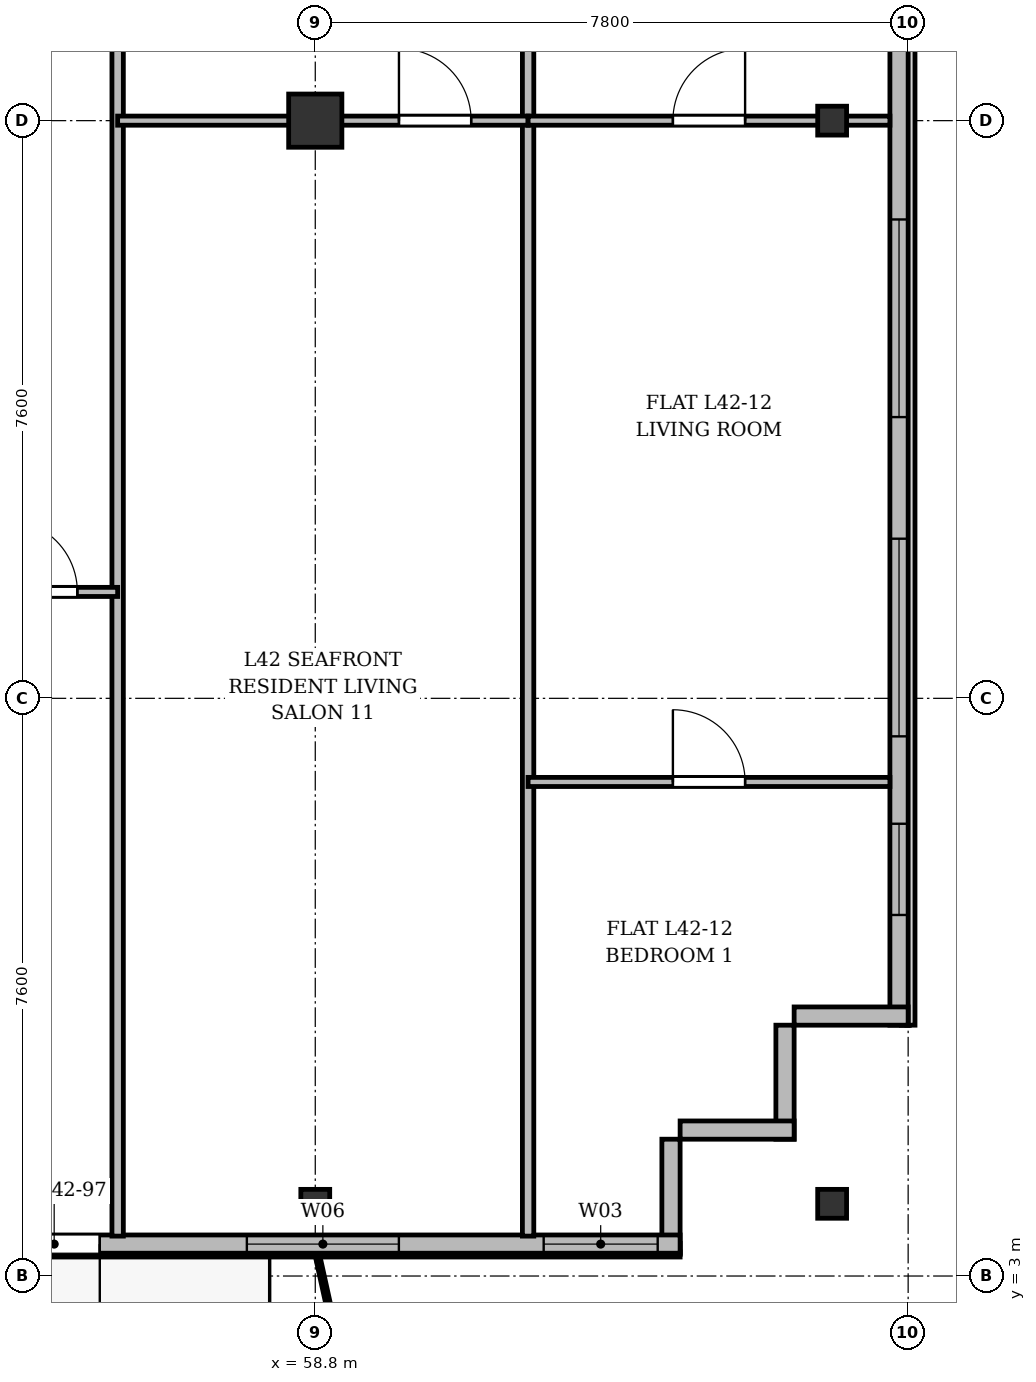
"""IFC4 building model, lengths in metres.
Left out: names, types, materials, properties, quantities, classifications, styles, units other than length and angle.
Written with IfcOpenShell. Run it as: python <this file> out.ifc"""

import sys

from ifc_helpers import new_model, si_unit, direction, frame, frame_2d, origin, origin_2d, place, context, subcontext, project, spatial, rectangle, i_section, extrude, source, transform, mapped, element, fill, save


model = new_model("IFC4")
c1 = context("Model", 3, precision=1e-05, world=origin(), true_north=direction((0.0, 1.0)))
c2 = subcontext(c1, "Body", "Model", "MODEL_VIEW")
j1 = project(units=[si_unit("LENGTHUNIT", "METRE"), si_unit("PLANEANGLEUNIT", "RADIAN")], contexts=[c1])
p1 = place(None, origin())
s1 = spatial("IfcSite", under=j1, at=p1, CompositionType="ELEMENT")
p2 = place(p1, origin())
s2 = spatial("IfcBuilding", under=s1, at=p2, CompositionType="ELEMENT")
p3 = place(p2, frame((0.0, 0.0, 160.9)))
s3 = spatial("IfcBuildingStorey", under=s2, at=p3, CompositionType="ELEMENT", Elevation=160.9)
m1 = source(origin(), c2, "Body", "SweptSolid", [
    extrude(i_section(OverallWidth=0.38, OverallDepth=0.38, WebThickness=0.02, FlangeThickness=0.03, at=origin_2d()), origin(), (0.0, 0.0, 1.0), 3.6),
])
p4 = place(p3, frame((58.8, 3.95, 0.0), z_axis=(0.0, 0.0, 1.0), x_axis=(1.0, 0.0, 0.0)))
e1 = element("IfcColumn", 1, at=p4, inside=s3, PredefinedType="COLUMN", context=c2, shape_type="MappedRepresentation", body=[
    mapped(m1, transform((0.0, 0.0, 0.0), x_axis=(1.0, 0.0, 0.0), y_axis=(0.0, 1.0, 0.0), z_axis=(0.0, 0.0, 1.0), scale=1.0)),
])
m2 = source(origin(), c2, "Body", "SweptSolid", [
    extrude(rectangle(XDim=0.7, YDim=0.7, at=origin_2d()), origin(), (0.0, 0.0, 1.0), 3.6),
])
p5 = place(p3, frame((58.8, 18.2, 0.0), z_axis=(0.0, 0.0, 1.0), x_axis=(1.0, 0.0, 0.0)))
e2 = element("IfcColumn", 2, at=p5, inside=s3, PredefinedType="COLUMN", context=c2, shape_type="MappedRepresentation", body=[
    mapped(m2, transform((0.0, 0.0, 0.0), x_axis=(1.0, 0.0, 0.0), y_axis=(0.0, 1.0, 0.0), z_axis=(0.0, 0.0, 1.0), scale=1.0)),
])
for number, where, z_axis, x_axis in (
    (3, (65.6, 3.95, 0.0), (0.0, 0.0, 1.0), (1.0, 0.0, 0.0)),
    (4, (65.6, 18.2, 0.0), (0.0, 0.0, 1.0), (1.0, 0.0, 0.0)),
):
    element("IfcColumn", number, at=place(p3, frame(where, z_axis=z_axis, x_axis=x_axis)), inside=s3, PredefinedType="COLUMN", context=c2, shape_type="MappedRepresentation", body=[
        mapped(m1, transform((0.0, 0.0, 0.0), x_axis=(1.0, 0.0, 0.0), y_axis=(0.0, 1.0, 0.0), z_axis=(0.0, 0.0, 1.0), scale=1.0)),
    ])
p6 = place(p3, frame((66.48, 45.5, 0.0), z_axis=(0.0, 0.0, 1.0), x_axis=(0.0, -1.0, 0.0)))
e5 = element("IfcWall", 5, at=p6, inside=s3, PredefinedType="SOLIDWALL", context=c2, shape_type="SweptSolid", body=[
    extrude(rectangle(XDim=39.2, YDim=0.24, at=frame_2d((19.6, 0.0))), origin(), (0.0, 0.0, 1.0), 3.35),
])
p7 = place(p6, frame((36.55, 0.0, 0.92)))
e6 = element("IfcOpeningElement", 6, at=p7, cuts=e5, PredefinedType="OPENING", context=c2, shape_type="SweptSolid", body=[
    extrude(rectangle(XDim=1.2, YDim=1.65, at=frame_2d((0.6, 0.825))), frame((0.0, 0.13, 0.0), z_axis=(0.0, -1.0, 0.0), x_axis=(1.0, 0.0, 0.0)), (0.0, 0.0, 1.0), 0.26),
])
p8 = place(p6, frame((32.8, 0.0, 0.92)))
e7 = element("IfcOpeningElement", 7, at=p8, cuts=e5, PredefinedType="OPENING", context=c2, shape_type="SweptSolid", body=[
    extrude(rectangle(XDim=2.6, YDim=1.9, at=frame_2d((1.3, 0.95))), frame((0.0, 0.13, 0.0), z_axis=(0.0, -1.0, 0.0), x_axis=(1.0, 0.0, 0.0)), (0.0, 0.0, 1.0), 0.26),
])
p9 = place(p6, frame((28.6, 0.0, 0.92)))
e8 = element("IfcOpeningElement", 8, at=p9, cuts=e5, PredefinedType="OPENING", context=c2, shape_type="SweptSolid", body=[
    extrude(rectangle(XDim=2.6, YDim=1.9, at=frame_2d((1.3, 0.95))), frame((0.0, 0.13, 0.0), z_axis=(0.0, -1.0, 0.0), x_axis=(1.0, 0.0, 0.0)), (0.0, 0.0, 1.0), 0.26),
])
p10 = place(p6, frame((21.4, 0.0, 0.92)))
e9 = element("IfcOpeningElement", 9, at=p10, cuts=e5, PredefinedType="OPENING", context=c2, shape_type="SweptSolid", body=[
    extrude(rectangle(XDim=2.6, YDim=1.9, at=frame_2d((1.3, 0.95))), frame((0.0, 0.13, 0.0), z_axis=(0.0, -1.0, 0.0), x_axis=(1.0, 0.0, 0.0)), (0.0, 0.0, 1.0), 0.26),
])
p11 = place(p6, frame((7.4, 0.0, 0.92)))
e10 = element("IfcOpeningElement", 10, at=p11, cuts=e5, PredefinedType="OPENING", context=c2, shape_type="SweptSolid", body=[
    extrude(rectangle(XDim=2.6, YDim=1.9, at=frame_2d((1.3, 0.95))), frame((0.0, 0.13, 0.0), z_axis=(0.0, -1.0, 0.0), x_axis=(1.0, 0.0, 0.0)), (0.0, 0.0, 1.0), 0.26),
])
p12 = place(p6, frame((4.5, 0.0, 0.92)))
e11 = element("IfcOpeningElement", 11, at=p12, cuts=e5, PredefinedType="OPENING", context=c2, shape_type="SweptSolid", body=[
    extrude(rectangle(XDim=1.2, YDim=1.65, at=frame_2d((0.6, 0.825))), frame((0.0, 0.13, 0.0), z_axis=(0.0, -1.0, 0.0), x_axis=(1.0, 0.0, 0.0)), (0.0, 0.0, 1.0), 0.26),
])
p13 = place(p6, frame((1.15, 0.0, 0.92)))
e12 = element("IfcOpeningElement", 12, at=p13, cuts=e5, PredefinedType="OPENING", context=c2, shape_type="SweptSolid", body=[
    extrude(rectangle(XDim=1.2, YDim=1.65, at=frame_2d((0.6, 0.825))), frame((0.0, 0.13, 0.0), z_axis=(0.0, -1.0, 0.0), x_axis=(1.0, 0.0, 0.0)), (0.0, 0.0, 1.0), 0.26),
])
p14 = place(p3, frame((66.6, 6.42, 0.0), z_axis=(0.0, 0.0, 1.0), x_axis=(-1.0, 0.0, 0.0)))
e13 = element("IfcWall", 13, at=p14, inside=s3, PredefinedType="SOLIDWALL", context=c2, shape_type="SweptSolid", body=[
    extrude(rectangle(XDim=1.5, YDim=0.24, at=frame_2d((0.75, 0.0))), origin(), (0.0, 0.0, 1.0), 2.85),
])
for number, where, z_axis, x_axis in (
    (14, (64.98, 6.3, 0.0), (0.0, 0.0, 1.0), (0.0, -1.0, 0.0)),
    (15, (65.1, 4.92, 0.0), (0.0, 0.0, 1.0), (-1.0, 0.0, 0.0)),
):
    element("IfcWall", number, at=place(p3, frame(where, z_axis=z_axis, x_axis=x_axis)), inside=s3, PredefinedType="SOLIDWALL", context=c2, shape_type="SweptSolid", body=[
        extrude(rectangle(XDim=1.5, YDim=0.24, at=frame_2d((0.75, 0.0))), origin(), (0.0, 0.0, 1.0), 3.35),
    ])
p15 = place(p3, frame((63.48, 4.8, 0.0), z_axis=(0.0, 0.0, 1.0), x_axis=(0.0, -1.0, 0.0)))
e16 = element("IfcWall", 16, at=p15, inside=s3, PredefinedType="SOLIDWALL", context=c2, shape_type="SweptSolid", body=[
    extrude(rectangle(XDim=1.5, YDim=0.24, at=frame_2d((0.75, 0.0))), origin(), (0.0, 0.0, 1.0), 2.75),
])
p16 = place(p3, frame((63.6, 3.42, 0.0), z_axis=(0.0, 0.0, 1.0), x_axis=(-1.0, 0.0, 0.0)))
e17 = element("IfcWall", 17, at=p16, inside=s3, PredefinedType="SOLIDWALL", context=c2, shape_type="SweptSolid", body=[
    extrude(rectangle(XDim=52.8, YDim=0.24, at=frame_2d((26.4, 0.0))), origin(), (0.0, 0.0, 1.0), 3.35),
])
p17 = place(p16, frame((0.295, 0.0, 0.9)))
e18 = element("IfcOpeningElement", 18, at=p17, cuts=e17, PredefinedType="OPENING", context=c2, shape_type="SweptSolid", body=[
    extrude(rectangle(XDim=1.5, YDim=1.75, at=frame_2d((0.75, 0.875))), frame((0.0, 0.13, 0.0), z_axis=(0.0, -1.0, 0.0), x_axis=(1.0, 0.0, 0.0)), (0.0, 0.0, 1.0), 0.26),
])
p18 = place(p16, frame((3.7, 0.0, 0.9)))
e19 = element("IfcOpeningElement", 19, at=p18, cuts=e17, PredefinedType="OPENING", context=c2, shape_type="SweptSolid", body=[
    extrude(rectangle(XDim=2.0, YDim=1.95, at=frame_2d((1.0, 0.975))), frame((0.0, 0.13, 0.0), z_axis=(0.0, -1.0, 0.0), x_axis=(1.0, 0.0, 0.0)), (0.0, 0.0, 1.0), 0.26),
])
p19 = place(p16, frame((7.635, 0.0, 0.0)))
e20 = element("IfcOpeningElement", 20, at=p19, cuts=e17, PredefinedType="OPENING", context=c2, shape_type="SweptSolid", body=[
    extrude(rectangle(XDim=1.2, YDim=2.2, at=frame_2d((0.6, 1.1))), frame((0.0, 0.13, 0.0), z_axis=(0.0, -1.0, 0.0), x_axis=(1.0, 0.0, 0.0)), (0.0, 0.0, 1.0), 0.26),
])
p20 = place(p16, frame((9.7, 0.0, 0.9)))
e21 = element("IfcOpeningElement", 21, at=p20, cuts=e17, PredefinedType="OPENING", context=c2, shape_type="SweptSolid", body=[
    extrude(rectangle(XDim=1.8, YDim=1.8, at=frame_2d((0.9, 0.9))), frame((0.0, 0.13, 0.0), z_axis=(0.0, -1.0, 0.0), x_axis=(1.0, 0.0, 0.0)), (0.0, 0.0, 1.0), 0.26),
])
p21 = place(p16, frame((12.25, 0.0, 0.9)))
e22 = element("IfcOpeningElement", 22, at=p21, cuts=e17, PredefinedType="OPENING", context=c2, shape_type="SweptSolid", body=[
    extrude(rectangle(XDim=1.5, YDim=1.75, at=frame_2d((0.75, 0.875))), frame((0.0, 0.13, 0.0), z_axis=(0.0, -1.0, 0.0), x_axis=(1.0, 0.0, 0.0)), (0.0, 0.0, 1.0), 0.26),
])
p22 = place(p16, frame((16.25, 0.0, 0.9)))
e23 = element("IfcOpeningElement", 23, at=p22, cuts=e17, PredefinedType="OPENING", context=c2, shape_type="SweptSolid", body=[
    extrude(rectangle(XDim=1.5, YDim=1.75, at=frame_2d((0.75, 0.875))), frame((0.0, 0.13, 0.0), z_axis=(0.0, -1.0, 0.0), x_axis=(1.0, 0.0, 0.0)), (0.0, 0.0, 1.0), 0.26),
])
p23 = place(p16, frame((22.4, 0.0, 0.9)))
e24 = element("IfcOpeningElement", 24, at=p23, cuts=e17, PredefinedType="OPENING", context=c2, shape_type="SweptSolid", body=[
    extrude(rectangle(XDim=2.0, YDim=1.95, at=frame_2d((1.0, 0.975))), frame((0.0, 0.13, 0.0), z_axis=(0.0, -1.0, 0.0), x_axis=(1.0, 0.0, 0.0)), (0.0, 0.0, 1.0), 0.26),
])
p24 = place(p16, frame((27.675, 0.0, 0.9)))
e25 = element("IfcOpeningElement", 25, at=p24, cuts=e17, PredefinedType="OPENING", context=c2, shape_type="SweptSolid", body=[
    extrude(rectangle(XDim=1.65, YDim=1.85, at=frame_2d((0.825, 0.925))), frame((0.0, 0.13, 0.0), z_axis=(0.0, -1.0, 0.0), x_axis=(1.0, 0.0, 0.0)), (0.0, 0.0, 1.0), 0.26),
])
p25 = place(p16, frame((30.6, 0.0, 0.9)))
e26 = element("IfcOpeningElement", 26, at=p25, cuts=e17, PredefinedType="OPENING", context=c2, shape_type="SweptSolid", body=[
    extrude(rectangle(XDim=1.8, YDim=1.8, at=frame_2d((0.9, 0.9))), frame((0.0, 0.13, 0.0), z_axis=(0.0, -1.0, 0.0), x_axis=(1.0, 0.0, 0.0)), (0.0, 0.0, 1.0), 0.26),
])
p26 = place(p16, frame((34.1, 0.0, 0.9)))
e27 = element("IfcOpeningElement", 27, at=p26, cuts=e17, PredefinedType="OPENING", context=c2, shape_type="SweptSolid", body=[
    extrude(rectangle(XDim=2.2, YDim=1.8, at=frame_2d((1.1, 0.9))), frame((0.0, 0.13, 0.0), z_axis=(0.0, -1.0, 0.0), x_axis=(1.0, 0.0, 0.0)), (0.0, 0.0, 1.0), 0.26),
])
p27 = place(p16, frame((39.65, 0.0, 0.9)))
e28 = element("IfcOpeningElement", 28, at=p27, cuts=e17, PredefinedType="OPENING", context=c2, shape_type="SweptSolid", body=[
    extrude(rectangle(XDim=1.5, YDim=1.75, at=frame_2d((0.75, 0.875))), frame((0.0, 0.13, 0.0), z_axis=(0.0, -1.0, 0.0), x_axis=(1.0, 0.0, 0.0)), (0.0, 0.0, 1.0), 0.26),
])
p28 = place(p16, frame((43.65, 0.0, 0.9)))
e29 = element("IfcOpeningElement", 29, at=p28, cuts=e17, PredefinedType="OPENING", context=c2, shape_type="SweptSolid", body=[
    extrude(rectangle(XDim=1.5, YDim=1.75, at=frame_2d((0.75, 0.875))), frame((0.0, 0.13, 0.0), z_axis=(0.0, -1.0, 0.0), x_axis=(1.0, 0.0, 0.0)), (0.0, 0.0, 1.0), 0.26),
])
p29 = place(p16, frame((47.275, 0.0, 0.9)))
e30 = element("IfcOpeningElement", 30, at=p29, cuts=e17, PredefinedType="OPENING", context=c2, shape_type="SweptSolid", body=[
    extrude(rectangle(XDim=1.65, YDim=1.85, at=frame_2d((0.825, 0.925))), frame((0.0, 0.13, 0.0), z_axis=(0.0, -1.0, 0.0), x_axis=(1.0, 0.0, 0.0)), (0.0, 0.0, 1.0), 0.26),
])
p30 = place(p16, frame((51.005, 0.0, 0.9)))
e31 = element("IfcOpeningElement", 31, at=p30, cuts=e17, PredefinedType="OPENING", context=c2, shape_type="SweptSolid", body=[
    extrude(rectangle(XDim=1.5, YDim=1.75, at=frame_2d((0.75, 0.875))), frame((0.0, 0.13, 0.0), z_axis=(0.0, -1.0, 0.0), x_axis=(1.0, 0.0, 0.0)), (0.0, 0.0, 1.0), 0.26),
])
p31 = place(p16, frame((37.85, 0.0, 0.0)))
e32 = element("IfcOpeningElement", 32, at=p31, cuts=e17, PredefinedType="OPENING", context=c2, shape_type="SweptSolid", body=[
    extrude(rectangle(XDim=1.2, YDim=2.2, at=frame_2d((0.6, 1.1))), frame((0.0, 0.13, 0.0), z_axis=(0.0, -1.0, 0.0), x_axis=(1.0, 0.0, 0.0)), (0.0, 0.0, 1.0), 0.26),
])
for number, where, z_axis, x_axis in (
    (33, (61.6, 3.525, 0.0), (0.0, 0.0, 1.0), (0.0, 1.0, 0.0)),
    (34, (56.2, 3.525, 0.0), (0.0, 0.0, 1.0), (0.0, 1.0, 0.0)),
):
    element("IfcWall", number, at=place(p3, frame(where, z_axis=z_axis, x_axis=x_axis)), inside=s3, PredefinedType="PARTITIONING", context=c2, shape_type="SweptSolid", body=[
        extrude(rectangle(XDim=27.275, YDim=0.15, at=frame_2d((13.638, 0.0))), origin(), (0.0, 0.0, 1.0), 2.75),
    ])
p32 = place(p3, frame((54.2, 12.0, 0.0), z_axis=(0.0, 0.0, 1.0), x_axis=(1.0, 0.0, 0.0)))
e35 = element("IfcWall", 35, at=p32, inside=s3, PredefinedType="PARTITIONING", context=c2, shape_type="SweptSolid", body=[
    extrude(rectangle(XDim=2.0, YDim=0.12, at=frame_2d((1.0, 0.0))), origin(), (0.0, 0.0, 1.0), 3.35),
])
p33 = place(p32, frame((0.52, 0.0, 0.0)))
e36 = element("IfcOpeningElement", 36, at=p33, cuts=e35, PredefinedType="OPENING", context=c2, shape_type="SweptSolid", body=[
    extrude(rectangle(XDim=0.95, YDim=2.15, at=frame_2d((0.475, 1.075))), frame((0.0, 0.07, 0.0), z_axis=(0.0, -1.0, 0.0), x_axis=(1.0, 0.0, 0.0)), (0.0, 0.0, 1.0), 0.14),
])
p34 = place(p3, frame((56.2, 18.2, 0.0), z_axis=(0.0, 0.0, 1.0), x_axis=(1.0, 0.0, 0.0)))
e37 = element("IfcWall", 37, at=p34, inside=s3, PredefinedType="PARTITIONING", context=c2, shape_type="SweptSolid", body=[
    extrude(rectangle(XDim=5.4, YDim=0.12, at=frame_2d((2.7, 0.0))), origin(), (0.0, 0.0, 1.0), 2.75),
])
p35 = place(p34, frame((3.701, 0.0, 0.0)))
e38 = element("IfcOpeningElement", 38, at=p35, cuts=e37, PredefinedType="OPENING", context=c2, shape_type="SweptSolid", body=[
    extrude(rectangle(XDim=0.95, YDim=2.15, at=frame_2d((0.475, 1.075))), frame((0.0, 0.07, 0.0), z_axis=(0.0, -1.0, 0.0), x_axis=(1.0, 0.0, 0.0)), (0.0, 0.0, 1.0), 0.14),
])
p36 = place(p3, frame((61.6, 18.2, 0.0), z_axis=(0.0, 0.0, 1.0), x_axis=(1.0, 0.0, 0.0)))
e39 = element("IfcWall", 39, at=p36, inside=s3, PredefinedType="PARTITIONING", context=c2, shape_type="SweptSolid", body=[
    extrude(rectangle(XDim=4.76, YDim=0.12, at=frame_2d((2.38, 0.0))), origin(), (0.0, 0.0, 1.0), 2.75),
])
p37 = place(p36, frame((1.905, 0.0, 0.0)))
e40 = element("IfcOpeningElement", 40, at=p37, cuts=e39, PredefinedType="OPENING", context=c2, shape_type="SweptSolid", body=[
    extrude(rectangle(XDim=0.95, YDim=2.15, at=frame_2d((0.475, 1.075))), frame((0.0, 0.07, 0.0), z_axis=(0.0, -1.0, 0.0), x_axis=(1.0, 0.0, 0.0)), (0.0, 0.0, 1.0), 0.14),
])
p38 = place(p3, frame((61.6, 9.5, 0.0), z_axis=(0.0, 0.0, 1.0), x_axis=(1.0, 0.0, 0.0)))
e41 = element("IfcWall", 41, at=p38, inside=s3, PredefinedType="PARTITIONING", context=c2, shape_type="SweptSolid", body=[
    extrude(rectangle(XDim=4.76, YDim=0.12, at=frame_2d((2.38, 0.0))), origin(), (0.0, 0.0, 1.0), 2.85),
])
p39 = place(p38, frame((1.905, 0.0, 0.0)))
e42 = element("IfcOpeningElement", 42, at=p39, cuts=e41, PredefinedType="OPENING", context=c2, shape_type="SweptSolid", body=[
    extrude(rectangle(XDim=0.95, YDim=2.15, at=frame_2d((0.475, 1.075))), frame((0.0, 0.07, 0.0), z_axis=(0.0, -1.0, 0.0), x_axis=(1.0, 0.0, 0.0)), (0.0, 0.0, 1.0), 0.14),
])
m3 = source(origin(), c2, "Body", "SweptSolid", [
    extrude(rectangle(XDim=1.2, YDim=1.65, at=frame_2d((0.6, 0.825))), frame((0.0, 0.03, 0.0), z_axis=(0.0, -1.0, 0.0), x_axis=(1.0, 0.0, 0.0)), (0.0, 0.0, 1.0), 0.06),
])
p40 = place(p7, origin())
e43 = element("IfcWindow", 43, at=p40, inside=s3, PartitioningType="SINGLE_PANEL", PredefinedType="WINDOW", context=c2, shape_type="MappedRepresentation", body=[
    mapped(m3, transform((0.0, 0.0, 0.0), x_axis=(1.0, 0.0, 0.0), y_axis=(0.0, 1.0, 0.0), z_axis=(0.0, 0.0, 1.0), scale=1.0)),
])
fill(e6, e43)
m4 = source(origin(), c2, "Body", "SweptSolid", [
    extrude(rectangle(XDim=2.6, YDim=1.9, at=frame_2d((1.3, 0.95))), frame((0.0, 0.03, 0.0), z_axis=(0.0, -1.0, 0.0), x_axis=(1.0, 0.0, 0.0)), (0.0, 0.0, 1.0), 0.06),
])
p41 = place(p8, origin())
e44 = element("IfcWindow", 44, at=p41, inside=s3, PartitioningType="SINGLE_PANEL", PredefinedType="WINDOW", context=c2, shape_type="MappedRepresentation", body=[
    mapped(m4, transform((0.0, 0.0, 0.0), x_axis=(1.0, 0.0, 0.0), y_axis=(0.0, 1.0, 0.0), z_axis=(0.0, 0.0, 1.0), scale=1.0)),
])
fill(e7, e44)
p42 = place(p9, origin())
e45 = element("IfcWindow", 45, at=p42, inside=s3, PartitioningType="SINGLE_PANEL", PredefinedType="WINDOW", context=c2, shape_type="MappedRepresentation", body=[
    mapped(m4, transform((0.0, 0.0, 0.0), x_axis=(1.0, 0.0, 0.0), y_axis=(0.0, 1.0, 0.0), z_axis=(0.0, 0.0, 1.0), scale=1.0)),
])
fill(e8, e45)
m5 = source(origin(), c2, "Body", "SweptSolid", [
    extrude(rectangle(XDim=1.5, YDim=1.75, at=frame_2d((0.75, 0.875))), frame((0.0, 0.03, 0.0), z_axis=(0.0, -1.0, 0.0), x_axis=(1.0, 0.0, 0.0)), (0.0, 0.0, 1.0), 0.06),
])
p43 = place(p17, origin())
e46 = element("IfcWindow", 46, at=p43, inside=s3, PartitioningType="SINGLE_PANEL", PredefinedType="WINDOW", context=c2, shape_type="MappedRepresentation", body=[
    mapped(m5, transform((0.0, 0.0, 0.0), x_axis=(1.0, 0.0, 0.0), y_axis=(0.0, 1.0, 0.0), z_axis=(0.0, 0.0, 1.0), scale=1.0)),
])
fill(e18, e46)
m6 = source(origin(), c2, "Body", "SweptSolid", [
    extrude(rectangle(XDim=2.0, YDim=1.95, at=frame_2d((1.0, 0.975))), frame((0.0, 0.03, 0.0), z_axis=(0.0, -1.0, 0.0), x_axis=(1.0, 0.0, 0.0)), (0.0, 0.0, 1.0), 0.06),
])
p44 = place(p18, origin())
e47 = element("IfcWindow", 47, at=p44, inside=s3, PartitioningType="SINGLE_PANEL", PredefinedType="WINDOW", context=c2, shape_type="MappedRepresentation", body=[
    mapped(m6, transform((0.0, 0.0, 0.0), x_axis=(1.0, 0.0, 0.0), y_axis=(0.0, 1.0, 0.0), z_axis=(0.0, 0.0, 1.0), scale=1.0)),
])
fill(e19, e47)
m7 = source(origin(), c2, "Body", "SweptSolid", [
    extrude(rectangle(XDim=1.2, YDim=2.2, at=frame_2d((0.6, 1.1))), frame((0.0, 0.025, 0.0), z_axis=(0.0, -1.0, 0.0), x_axis=(1.0, 0.0, 0.0)), (0.0, 0.0, 1.0), 0.05),
])
p45 = place(p19, origin())
e48 = element("IfcDoor", 48, at=p45, inside=s3, OperationType="SINGLE_SWING_LEFT", PredefinedType="DOOR", context=c2, shape_type="MappedRepresentation", body=[
    mapped(m7, transform((0.0, 0.0, 0.0), x_axis=(1.0, 0.0, 0.0), y_axis=(0.0, 1.0, 0.0), z_axis=(0.0, 0.0, 1.0), scale=1.0)),
])
fill(e20, e48)
m8 = source(origin(), c2, "Body", "SweptSolid", [
    extrude(rectangle(XDim=0.95, YDim=2.15, at=frame_2d((0.475, 1.075))), frame((0.0, 0.025, 0.0), z_axis=(0.0, -1.0, 0.0), x_axis=(1.0, 0.0, 0.0)), (0.0, 0.0, 1.0), 0.05),
])
p46 = place(p33, origin())
e49 = element("IfcDoor", 49, at=p46, inside=s3, OperationType="SINGLE_SWING_LEFT", PredefinedType="DOOR", context=c2, shape_type="MappedRepresentation", body=[
    mapped(m8, transform((0.0, 0.0, 0.0), x_axis=(1.0, 0.0, 0.0), y_axis=(0.0, 1.0, 0.0), z_axis=(0.0, 0.0, 1.0), scale=1.0)),
])
fill(e36, e49)
p47 = place(p35, origin())
e50 = element("IfcDoor", 50, at=p47, inside=s3, OperationType="SINGLE_SWING_LEFT", PredefinedType="DOOR", context=c2, shape_type="MappedRepresentation", body=[
    mapped(m8, transform((0.0, 0.0, 0.0), x_axis=(1.0, 0.0, 0.0), y_axis=(0.0, 1.0, 0.0), z_axis=(0.0, 0.0, 1.0), scale=1.0)),
])
fill(e38, e50)
p48 = place(p37, origin())
e51 = element("IfcDoor", 51, at=p48, inside=s3, OperationType="SINGLE_SWING_RIGHT", PredefinedType="DOOR", context=c2, shape_type="MappedRepresentation", body=[
    mapped(m8, transform((0.0, 0.0, 0.0), x_axis=(1.0, 0.0, 0.0), y_axis=(0.0, 1.0, 0.0), z_axis=(0.0, 0.0, 1.0), scale=1.0)),
])
fill(e40, e51)
p49 = place(p39, origin())
e52 = element("IfcDoor", 52, at=p49, inside=s3, OperationType="SINGLE_SWING_LEFT", PredefinedType="DOOR", context=c2, shape_type="MappedRepresentation", body=[
    mapped(m8, transform((0.0, 0.0, 0.0), x_axis=(1.0, 0.0, 0.0), y_axis=(0.0, 1.0, 0.0), z_axis=(0.0, 0.0, 1.0), scale=1.0)),
])
fill(e42, e52)
save(model, sys.argv[1])
